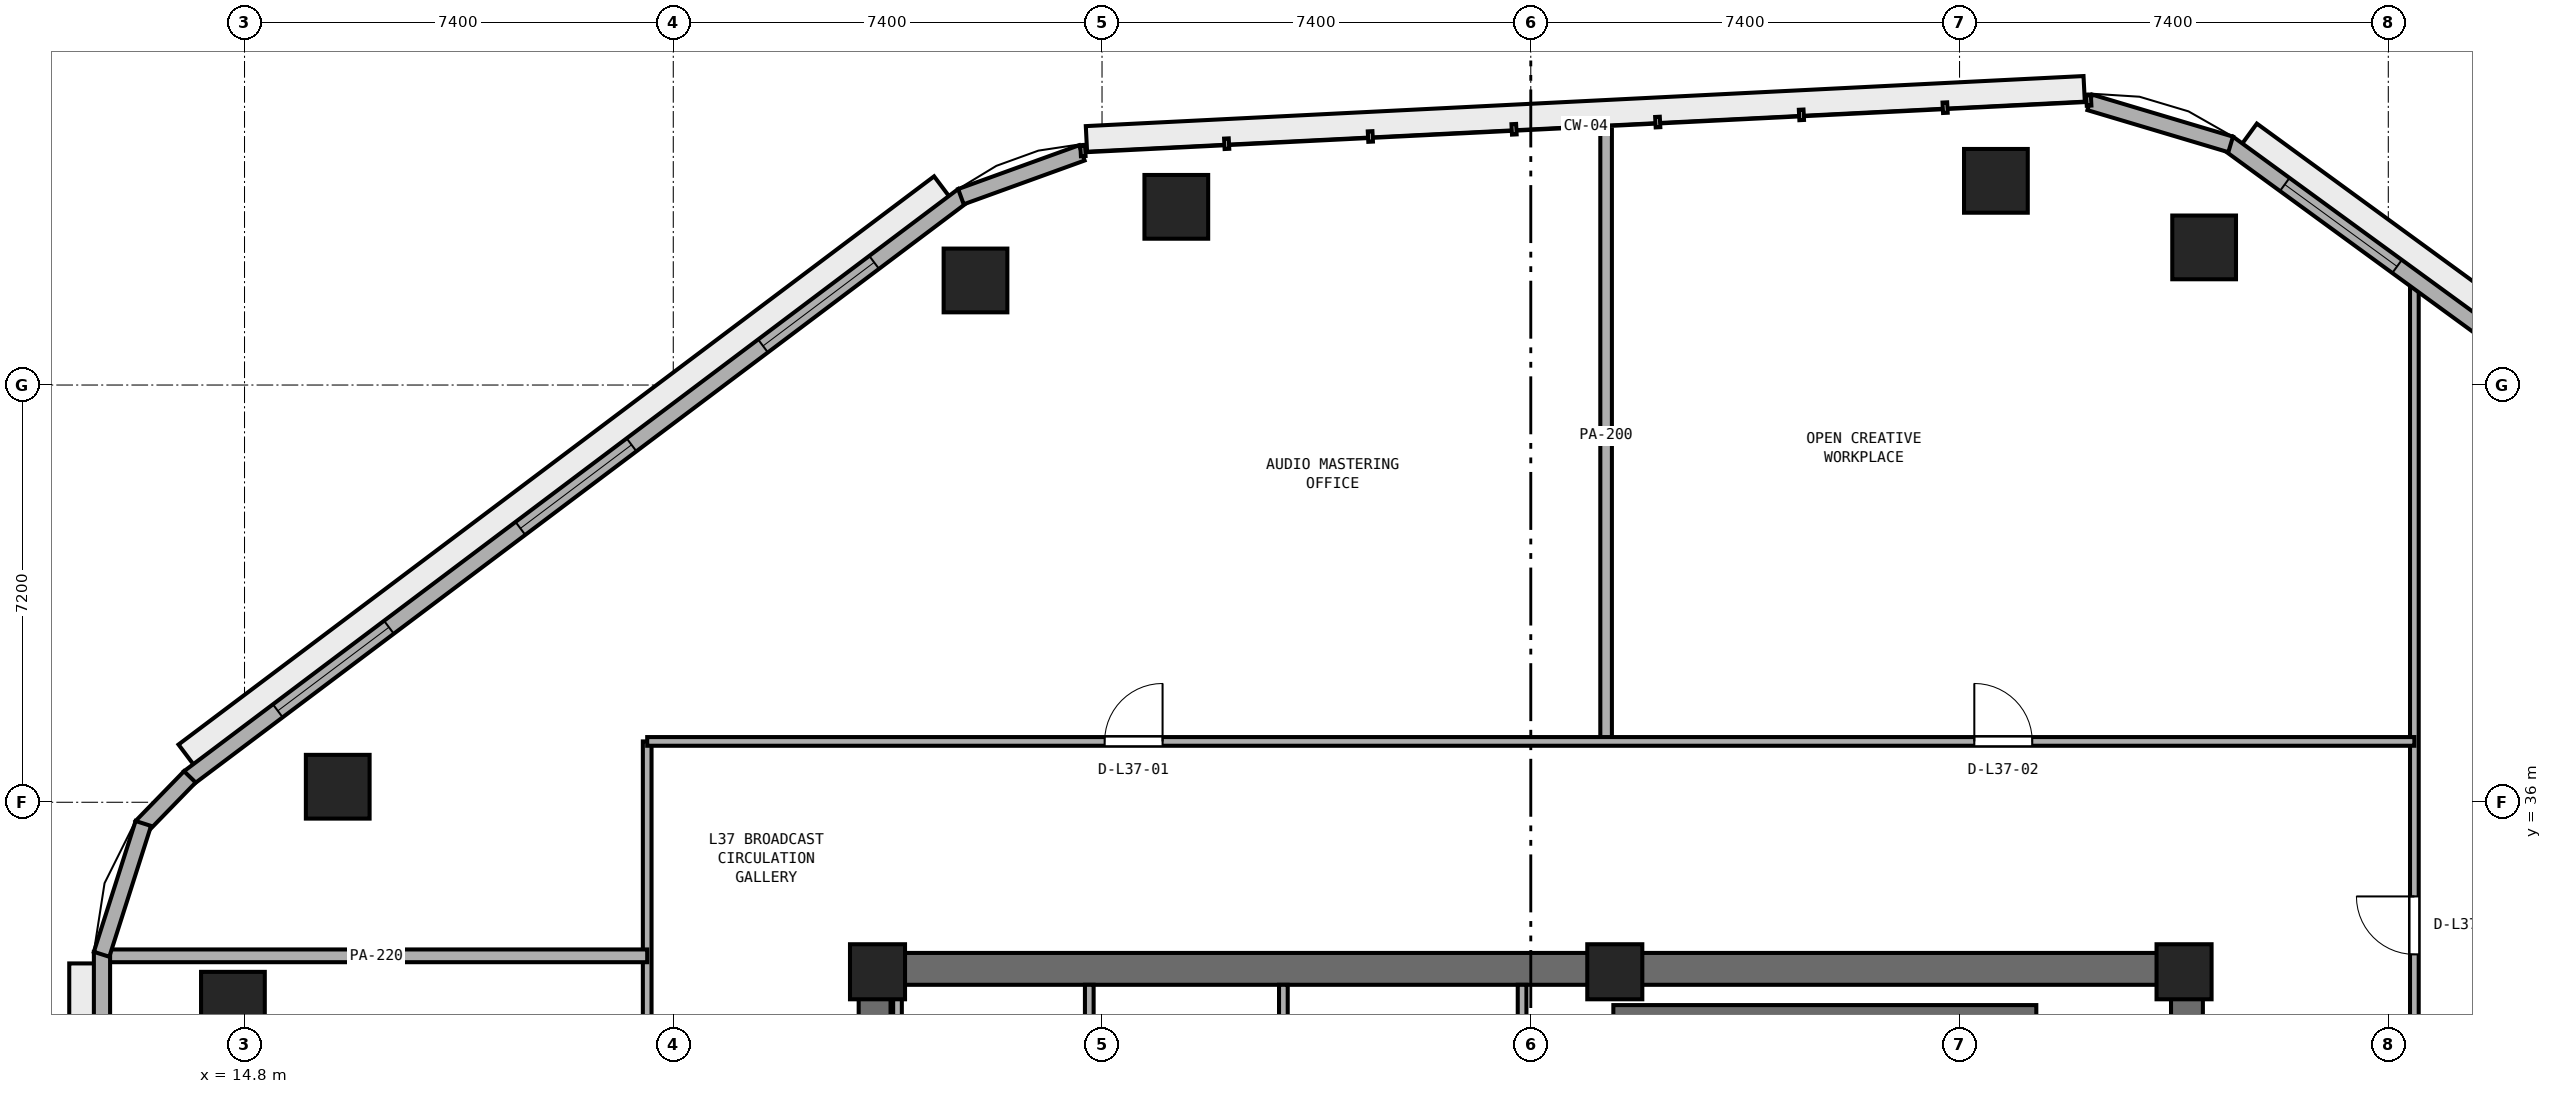
"""IFC4 building model, lengths in metres.
Left out: names, types, materials, properties, quantities, classifications, styles, units other than length and angle.
Written with IfcOpenShell. Run it as: python <this file> out.ifc"""

import sys

from ifc_helpers import new_model, si_unit, direction, frame, frame_2d, origin, origin_2d, place, context, subcontext, project, spatial, rectangle, extrude, element, fill, save


model = new_model("IFC4")
c1 = context("Model", 3, precision=1e-05, world=origin(), true_north=direction((0.0, 1.0)))
c2 = subcontext(c1, "Body", "Model", "MODEL_VIEW")
j1 = project(units=[si_unit("LENGTHUNIT", "METRE"), si_unit("PLANEANGLEUNIT", "RADIAN")], contexts=[c1])
p1 = place(None, origin())
s1 = spatial("IfcSite", under=j1, at=p1, CompositionType="ELEMENT")
p2 = place(p1, origin())
s2 = spatial("IfcBuilding", under=s1, at=p2, CompositionType="ELEMENT")
p3 = place(p2, frame((0.0, 0.0, 147.8)))
s3 = spatial("IfcBuildingStorey", under=s2, at=p3, CompositionType="ELEMENT", Elevation=147.8)
p4 = place(p3, frame((25.4, 33.125, 0.0), z_axis=(0.0, 0.0, 1.0), x_axis=(1.0, 0.0, 0.0)))
e1 = element("IfcWall", 1, at=p4, inside=s3, PredefinedType="SHEAR", context=c2, shape_type="SweptSolid", body=[
    extrude(rectangle(XDim=23.2, YDim=0.55, at=frame_2d((11.6, 0.0))), origin(), (0.0, 0.0, 1.0), 3.54),
])
p5 = place(p3, frame((25.675, 17.55, 0.0), z_axis=(0.0, 0.0, 1.0), x_axis=(0.0, 1.0, 0.0)))
e2 = element("IfcWall", 2, at=p5, inside=s3, PredefinedType="SHEAR", context=c2, shape_type="SweptSolid", body=[
    extrude(rectangle(XDim=15.3, YDim=0.55, at=frame_2d((7.65, 0.0))), origin(), (0.0, 0.0, 1.0), 3.54),
])
p6 = place(p5, frame((6.9, 0.0, 0.0)))
e3 = element("IfcOpeningElement", 3, at=p6, cuts=e2, PredefinedType="OPENING", context=c2, shape_type="SweptSolid", body=[
    extrude(rectangle(XDim=1.5, YDim=2.15, at=frame_2d((0.75, 1.075))), frame((0.0, 0.285, 0.0), z_axis=(0.0, -1.0, 0.0), x_axis=(1.0, 0.0, 0.0)), (0.0, 0.0, 1.0), 0.57),
])
p7 = place(p3, frame((48.325, 17.55, 0.0), z_axis=(0.0, 0.0, 1.0), x_axis=(0.0, 1.0, 0.0)))
e4 = element("IfcWall", 4, at=p7, inside=s3, PredefinedType="SHEAR", context=c2, shape_type="SweptSolid", body=[
    extrude(rectangle(XDim=15.3, YDim=0.55, at=frame_2d((7.65, 0.0))), origin(), (0.0, 0.0, 1.0), 3.54),
])
p8 = place(p7, frame((5.75, 0.0, 0.0)))
e5 = element("IfcOpeningElement", 5, at=p8, cuts=e4, PredefinedType="OPENING", context=c2, shape_type="SweptSolid", body=[
    extrude(rectangle(XDim=1.5, YDim=2.15, at=frame_2d((0.75, 1.075))), frame((0.0, 0.285, 0.0), z_axis=(0.0, -1.0, 0.0), x_axis=(1.0, 0.0, 0.0)), (0.0, 0.0, 1.0), 0.57),
])
for number, where, z_axis, x_axis in (
    (6, (48.275, 33.075, 0.0), (0.0, 0.0, 1.0), (1.0, 0.0, 0.0)),
    (7, (38.45, 33.075, 0.0), (0.0, 0.0, 1.0), (1.0, 0.0, 0.0)),
    (8, (25.725, 33.075, 0.0), (0.0, 0.0, 1.0), (1.0, 0.0, 0.0)),
):
    element("IfcColumn", number, at=place(p3, frame(where, z_axis=z_axis, x_axis=x_axis)), inside=s3, PredefinedType="PILASTER", context=c2, shape_type="SweptSolid", body=[
        extrude(rectangle(XDim=0.95, YDim=0.95, at=origin_2d()), origin(), (0.0, 0.0, 1.0), 3.8),
    ])
for number, where, z_axis, x_axis in (
    (9, (48.622, 45.575, 0.0), (0.0, 0.0, 1.0), (1.0, 0.0, 0.0)),
    (10, (45.028, 46.724, 0.0), (0.0, 0.0, 1.0), (1.0, 0.0, 0.0)),
    (11, (30.882, 46.275, 0.0), (0.0, 0.0, 1.0), (1.0, 0.0, 0.0)),
    (12, (27.416, 45.004, 0.0), (0.0, 0.0, 1.0), (1.0, 0.0, 0.0)),
    (13, (16.409, 36.268, 0.0), (0.0, 0.0, 1.0), (1.0, 0.0, 0.0)),
    (14, (14.6, 32.523, 0.0), (0.0, 0.0, 1.0), (1.0, 0.0, 0.0)),
):
    element("IfcColumn", number, at=place(p3, frame(where, z_axis=z_axis, x_axis=x_axis)), inside=s3, PredefinedType="COLUMN", context=c2, shape_type="SweptSolid", body=[
        extrude(rectangle(XDim=1.1, YDim=1.1, at=origin_2d()), origin(), (0.0, 0.0, 1.0), 3.8),
    ])
p9 = place(p3, frame((38.425, 32.375, 0.0), z_axis=(0.0, 0.0, 1.0), x_axis=(1.0, 0.0, 0.0)))
e15 = element("IfcWall", 15, at=p9, inside=s3, PredefinedType="SHEAR", context=c2, shape_type="SweptSolid", body=[
    extrude(rectangle(XDim=7.3, YDim=0.25, at=frame_2d((3.65, 0.0))), origin(), (0.0, 0.0, 1.0), 3.54),
])
p10 = place(p3, frame((26.07, 30.65, 0.0), z_axis=(0.0, 0.0, 1.0), x_axis=(0.0, 1.0, 0.0)))
e16 = element("IfcWall", 16, at=p10, inside=s3, PredefinedType="PARTITIONING", context=c2, shape_type="SweptSolid", body=[
    extrude(rectangle(XDim=2.2, YDim=0.15, at=frame_2d((1.1, 0.0))), origin(), (0.0, 0.0, 1.0), 2.64),
])
for number, where, z_axis, x_axis in (
    (17, (29.38, 30.65, 0.0), (0.0, 0.0, 1.0), (0.0, 1.0, 0.0)),
    (18, (32.73, 30.65, 0.0), (0.0, 0.0, 1.0), (0.0, 1.0, 0.0)),
    (19, (36.85, 30.65, 0.0), (0.0, 0.0, 1.0), (0.0, 1.0, 0.0)),
):
    element("IfcWall", number, at=place(p3, frame(where, z_axis=z_axis, x_axis=x_axis)), inside=s3, PredefinedType="PARTITIONING", context=c2, shape_type="SweptSolid", body=[
        extrude(rectangle(XDim=2.2, YDim=0.15, at=frame_2d((1.1, 0.0))), origin(), (0.0, 0.0, 1.0), 3.54),
    ])
p11 = place(p3, frame((52.25, 26.55, 0.0), z_axis=(0.0, 0.0, 1.0), x_axis=(0.0, 1.0, 0.0)))
e20 = element("IfcWall", 20, at=p11, inside=s3, PredefinedType="PARTITIONING", context=c2, shape_type="SweptSolid", body=[
    extrude(rectangle(XDim=18.512, YDim=0.15, at=frame_2d((9.256, 0.0))), origin(), (0.0, 0.0, 1.0), 3.54),
])
p12 = place(p11, frame((6.825, 0.0, 0.0)))
e21 = element("IfcOpeningElement", 21, at=p12, cuts=e20, PredefinedType="OPENING", context=c2, shape_type="SweptSolid", body=[
    extrude(rectangle(XDim=1.0, YDim=2.12, at=frame_2d((0.5, 1.06))), frame((0.0, 0.085, 0.0), z_axis=(0.0, -1.0, 0.0), x_axis=(1.0, 0.0, 0.0)), (0.0, 0.0, 1.0), 0.17),
])
p13 = place(p3, frame((38.3, 37.05, 0.0), z_axis=(0.0, 0.0, 1.0), x_axis=(0.0, 1.0, 0.0)))
e22 = element("IfcWall", 22, at=p13, inside=s3, PredefinedType="PARTITIONING", context=c2, shape_type="SweptSolid", body=[
    extrude(rectangle(XDim=10.558, YDim=0.2, at=frame_2d((5.279, 0.0))), origin(), (0.0, 0.0, 1.0), 3.54),
])
p14 = place(p3, frame((21.75, 26.55, 0.0), z_axis=(0.0, 0.0, 1.0), x_axis=(0.0, 1.0, 0.0)))
e23 = element("IfcWall", 23, at=p14, inside=s3, PredefinedType="PARTITIONING", context=c2, shape_type="SweptSolid", body=[
    extrude(rectangle(XDim=10.5, YDim=0.15, at=frame_2d((5.25, 0.0))), origin(), (0.0, 0.0, 1.0), 3.54),
])
p15 = place(p3, frame((12.405, 33.35, 0.0), z_axis=(0.0, 0.0, 1.0), x_axis=(1.0, 0.0, 0.0)))
e24 = element("IfcWall", 24, at=p15, inside=s3, PredefinedType="PARTITIONING", context=c2, shape_type="SweptSolid", body=[
    extrude(rectangle(XDim=9.345, YDim=0.22, at=frame_2d((4.672, 0.0))), origin(), (0.0, 0.0, 1.0), 3.54),
])
p16 = place(p3, frame((21.75, 37.05, 0.0), z_axis=(0.0, 0.0, 1.0), x_axis=(1.0, 0.0, 0.0)))
e25 = element("IfcWall", 25, at=p16, inside=s3, PredefinedType="PARTITIONING", context=c2, shape_type="SweptSolid", body=[
    extrude(rectangle(XDim=30.5, YDim=0.15, at=frame_2d((15.25, 0.0))), origin(), (0.0, 0.0, 1.0), 3.54),
])
p17 = place(p16, frame((7.895, 0.0, 0.0)))
e26 = element("IfcOpeningElement", 26, at=p17, cuts=e25, PredefinedType="OPENING", context=c2, shape_type="SweptSolid", body=[
    extrude(rectangle(XDim=1.0, YDim=2.12, at=frame_2d((0.5, 1.06))), frame((0.0, 0.085, 0.0), z_axis=(0.0, -1.0, 0.0), x_axis=(1.0, 0.0, 0.0)), (0.0, 0.0, 1.0), 0.17),
])
p18 = place(p16, frame((22.905, 0.0, 0.0)))
e27 = element("IfcOpeningElement", 27, at=p18, cuts=e25, PredefinedType="OPENING", context=c2, shape_type="SweptSolid", body=[
    extrude(rectangle(XDim=1.0, YDim=2.12, at=frame_2d((0.5, 1.06))), frame((0.0, 0.085, 0.0), z_axis=(0.0, -1.0, 0.0), x_axis=(1.0, 0.0, 0.0)), (0.0, 0.0, 1.0), 0.17),
])
p19 = place(p3, frame((61.516, 38.267, 0.0), z_axis=(0.0, 0.0, 1.0), x_axis=(-0.807812505785, 0.589439526582, 0.0)))
e28 = element("IfcWall", 28, at=p19, inside=s3, PredefinedType="STANDARD", context=c2, shape_type="SweptSolid", body=[
    extrude(rectangle(XDim=15.448, YDim=0.28, at=frame_2d((7.724, 0.0))), origin(), (0.0, 0.0, 1.0), 3.54),
])
p20 = place(p19, frame((1.708, 0.0, 0.9)))
e29 = element("IfcOpeningElement", 29, at=p20, cuts=e28, PredefinedType="OPENING", context=c2, shape_type="SweptSolid", body=[
    extrude(rectangle(XDim=2.4, YDim=1.75, at=frame_2d((1.2, 0.875))), frame((0.0, 0.15, 0.0), z_axis=(0.0, -1.0, 0.0), x_axis=(1.0, 0.0, 0.0)), (0.0, 0.0, 1.0), 0.3),
])
p21 = place(p19, frame((6.524, 0.0, 0.9)))
e30 = element("IfcOpeningElement", 30, at=p21, cuts=e28, PredefinedType="OPENING", context=c2, shape_type="SweptSolid", body=[
    extrude(rectangle(XDim=2.4, YDim=1.75, at=frame_2d((1.2, 0.875))), frame((0.0, 0.15, 0.0), z_axis=(0.0, -1.0, 0.0), x_axis=(1.0, 0.0, 0.0)), (0.0, 0.0, 1.0), 0.3),
])
p22 = place(p19, frame((11.84, 0.0, 0.9)))
e31 = element("IfcOpeningElement", 31, at=p22, cuts=e28, PredefinedType="OPENING", context=c2, shape_type="SweptSolid", body=[
    extrude(rectangle(XDim=2.4, YDim=1.75, at=frame_2d((1.2, 0.875))), frame((0.0, 0.15, 0.0), z_axis=(0.0, -1.0, 0.0), x_axis=(1.0, 0.0, 0.0)), (0.0, 0.0, 1.0), 0.3),
])
p23 = place(p3, frame((27.201, 46.47, 0.0), z_axis=(0.0, 0.0, 1.0), x_axis=(-0.799280853427, -0.600957666849, 0.0)))
e32 = element("IfcWall", 32, at=p23, inside=s3, PredefinedType="STANDARD", context=c2, shape_type="SweptSolid", body=[
    extrude(rectangle(XDim=16.716, YDim=0.28, at=frame_2d((8.358, 0.0))), origin(), (0.0, 0.0, 1.0), 3.54),
])
p24 = place(p23, frame((1.919, 0.0, 0.9)))
e33 = element("IfcOpeningElement", 33, at=p24, cuts=e32, PredefinedType="OPENING", context=c2, shape_type="SweptSolid", body=[
    extrude(rectangle(XDim=2.4, YDim=1.75, at=frame_2d((1.2, 0.875))), frame((0.0, 0.15, 0.0), z_axis=(0.0, -1.0, 0.0), x_axis=(1.0, 0.0, 0.0)), (0.0, 0.0, 1.0), 0.3),
])
p25 = place(p23, frame((7.158, 0.0, 0.9)))
e34 = element("IfcOpeningElement", 34, at=p25, cuts=e32, PredefinedType="OPENING", context=c2, shape_type="SweptSolid", body=[
    extrude(rectangle(XDim=2.4, YDim=1.75, at=frame_2d((1.2, 0.875))), frame((0.0, 0.15, 0.0), z_axis=(0.0, -1.0, 0.0), x_axis=(1.0, 0.0, 0.0)), (0.0, 0.0, 1.0), 0.3),
])
p26 = place(p23, frame((12.397, 0.0, 0.9)))
e35 = element("IfcOpeningElement", 35, at=p26, cuts=e32, PredefinedType="OPENING", context=c2, shape_type="SweptSolid", body=[
    extrude(rectangle(XDim=2.4, YDim=1.75, at=frame_2d((1.2, 0.875))), frame((0.0, 0.15, 0.0), z_axis=(0.0, -1.0, 0.0), x_axis=(1.0, 0.0, 0.0)), (0.0, 0.0, 1.0), 0.3),
])
p27 = place(p3, frame((12.34, 33.419, 0.0), z_axis=(0.0, 0.0, 1.0), x_axis=(0.0, -1.0, 0.0)))
e36 = element("IfcWall", 36, at=p27, inside=s3, PredefinedType="STANDARD", context=c2, shape_type="SweptSolid", body=[
    extrude(rectangle(XDim=17.232, YDim=0.28, at=frame_2d((8.616, 0.0))), origin(), (0.0, 0.0, 1.0), 3.54),
])
p28 = place(p27, frame((8.066, 0.0, 0.0)))
e37 = element("IfcOpeningElement", 37, at=p28, cuts=e36, PredefinedType="OPENING", context=c2, shape_type="SweptSolid", body=[
    extrude(rectangle(XDim=1.1, YDim=2.2, at=frame_2d((0.55, 1.1))), frame((0.0, 0.15, 0.0), z_axis=(0.0, -1.0, 0.0), x_axis=(1.0, 0.0, 0.0)), (0.0, 0.0, 1.0), 0.3),
])
p29 = place(p27, frame((2.005, 0.0, 0.9)))
e38 = element("IfcOpeningElement", 38, at=p29, cuts=e36, PredefinedType="OPENING", context=c2, shape_type="SweptSolid", body=[
    extrude(rectangle(XDim=2.4, YDim=1.75, at=frame_2d((1.2, 0.875))), frame((0.0, 0.15, 0.0), z_axis=(0.0, -1.0, 0.0), x_axis=(1.0, 0.0, 0.0)), (0.0, 0.0, 1.0), 0.3),
])
p30 = place(p27, frame((12.827, 0.0, 0.9)))
e39 = element("IfcOpeningElement", 39, at=p30, cuts=e36, PredefinedType="OPENING", context=c2, shape_type="SweptSolid", body=[
    extrude(rectangle(XDim=2.4, YDim=1.75, at=frame_2d((1.2, 0.875))), frame((0.0, 0.15, 0.0), z_axis=(0.0, -1.0, 0.0), x_axis=(1.0, 0.0, 0.0)), (0.0, 0.0, 1.0), 0.3),
])
p31 = place(p3, frame((49.079, 47.352, 0.0), z_axis=(0.0, 0.0, 1.0), x_axis=(-0.958211930429, 0.286059253272, 0.0)))
e40 = element("IfcWall", 40, at=p31, inside=s3, PredefinedType="STANDARD", context=c2, shape_type="SweptSolid", body=[
    extrude(rectangle(XDim=2.538, YDim=0.28, at=frame_2d((1.269, 0.0))), origin(), (0.0, 0.0, 1.0), 3.54),
])
p32 = place(p3, frame((29.252, 47.206, 0.0), z_axis=(0.0, 0.0, 1.0), x_axis=(-0.940242174664, -0.340506465406, 0.0)))
e41 = element("IfcWall", 41, at=p32, inside=s3, PredefinedType="STANDARD", context=c2, shape_type="SweptSolid", body=[
    extrude(rectangle(XDim=2.22, YDim=0.28, at=frame_2d((1.11, 0.0))), origin(), (0.0, 0.0, 1.0), 3.54),
])
p33 = place(p3, frame((13.856, 36.438, 0.0), z_axis=(0.0, 0.0, 1.0), x_axis=(-0.697369094044, -0.716712178404, 0.0)))
e42 = element("IfcWall", 42, at=p33, inside=s3, PredefinedType="STANDARD", context=c2, shape_type="SweptSolid", body=[
    extrude(rectangle(XDim=1.199, YDim=0.28, at=frame_2d((0.6, 0.0))), origin(), (0.0, 0.0, 1.0), 3.54),
])
p34 = place(p3, frame((13.053, 35.634, 0.0), z_axis=(0.0, 0.0, 1.0), x_axis=(-0.303807416298, -0.952733464198, 0.0)))
e43 = element("IfcWall", 43, at=p34, inside=s3, PredefinedType="STANDARD", context=c2, shape_type="SweptSolid", body=[
    extrude(rectangle(XDim=2.37, YDim=0.28, at=frame_2d((1.185, 0.0))), origin(), (0.0, 0.0, 1.0), 3.54),
])
p35 = place(p17, origin())
e44 = element("IfcDoor", 44, at=p35, inside=s3, OperationType="SINGLE_SWING_RIGHT", PredefinedType="DOOR", context=c2, shape_type="SweptSolid", body=[
    extrude(rectangle(XDim=1.0, YDim=2.12, at=frame_2d((0.5, 1.06))), frame((0.0, 0.025, 0.0), z_axis=(0.0, -1.0, 0.0), x_axis=(1.0, 0.0, 0.0)), (0.0, 0.0, 1.0), 0.05),
])
fill(e26, e44)
p36 = place(p18, origin())
e45 = element("IfcDoor", 45, at=p36, inside=s3, OperationType="SINGLE_SWING_LEFT", PredefinedType="DOOR", context=c2, shape_type="SweptSolid", body=[
    extrude(rectangle(XDim=1.0, YDim=2.12, at=frame_2d((0.5, 1.06))), frame((0.0, 0.025, 0.0), z_axis=(0.0, -1.0, 0.0), x_axis=(1.0, 0.0, 0.0)), (0.0, 0.0, 1.0), 0.05),
])
fill(e27, e45)
p37 = place(p12, origin())
e46 = element("IfcDoor", 46, at=p37, inside=s3, OperationType="SINGLE_SWING_RIGHT", PredefinedType="DOOR", context=c2, shape_type="SweptSolid", body=[
    extrude(rectangle(XDim=1.0, YDim=2.12, at=frame_2d((0.5, 1.06))), frame((0.0, 0.025, 0.0), z_axis=(0.0, -1.0, 0.0), x_axis=(1.0, 0.0, 0.0)), (0.0, 0.0, 1.0), 0.05),
])
fill(e21, e46)
p38 = place(p22, origin())
e47 = element("IfcWindow", 47, at=p38, inside=s3, PartitioningType="SINGLE_PANEL", PredefinedType="WINDOW", context=c2, shape_type="SweptSolid", body=[
    extrude(rectangle(XDim=2.4, YDim=1.75, at=frame_2d((1.2, 0.875))), frame((0.0, 0.03, 0.0), z_axis=(0.0, -1.0, 0.0), x_axis=(1.0, 0.0, 0.0)), (0.0, 0.0, 1.0), 0.06),
])
fill(e31, e47)
p39 = place(p24, origin())
e48 = element("IfcWindow", 48, at=p39, inside=s3, PartitioningType="SINGLE_PANEL", PredefinedType="WINDOW", context=c2, shape_type="SweptSolid", body=[
    extrude(rectangle(XDim=2.4, YDim=1.75, at=frame_2d((1.2, 0.875))), frame((0.0, 0.03, 0.0), z_axis=(0.0, -1.0, 0.0), x_axis=(1.0, 0.0, 0.0)), (0.0, 0.0, 1.0), 0.06),
])
fill(e33, e48)
p40 = place(p25, origin())
e49 = element("IfcWindow", 49, at=p40, inside=s3, PartitioningType="SINGLE_PANEL", PredefinedType="WINDOW", context=c2, shape_type="SweptSolid", body=[
    extrude(rectangle(XDim=2.4, YDim=1.75, at=frame_2d((1.2, 0.875))), frame((0.0, 0.03, 0.0), z_axis=(0.0, -1.0, 0.0), x_axis=(1.0, 0.0, 0.0)), (0.0, 0.0, 1.0), 0.06),
])
fill(e34, e49)
p41 = place(p26, origin())
e50 = element("IfcWindow", 50, at=p41, inside=s3, PartitioningType="SINGLE_PANEL", PredefinedType="WINDOW", context=c2, shape_type="SweptSolid", body=[
    extrude(rectangle(XDim=2.4, YDim=1.75, at=frame_2d((1.2, 0.875))), frame((0.0, 0.03, 0.0), z_axis=(0.0, -1.0, 0.0), x_axis=(1.0, 0.0, 0.0)), (0.0, 0.0, 1.0), 0.06),
])
fill(e35, e50)
save(model, sys.argv[1])
